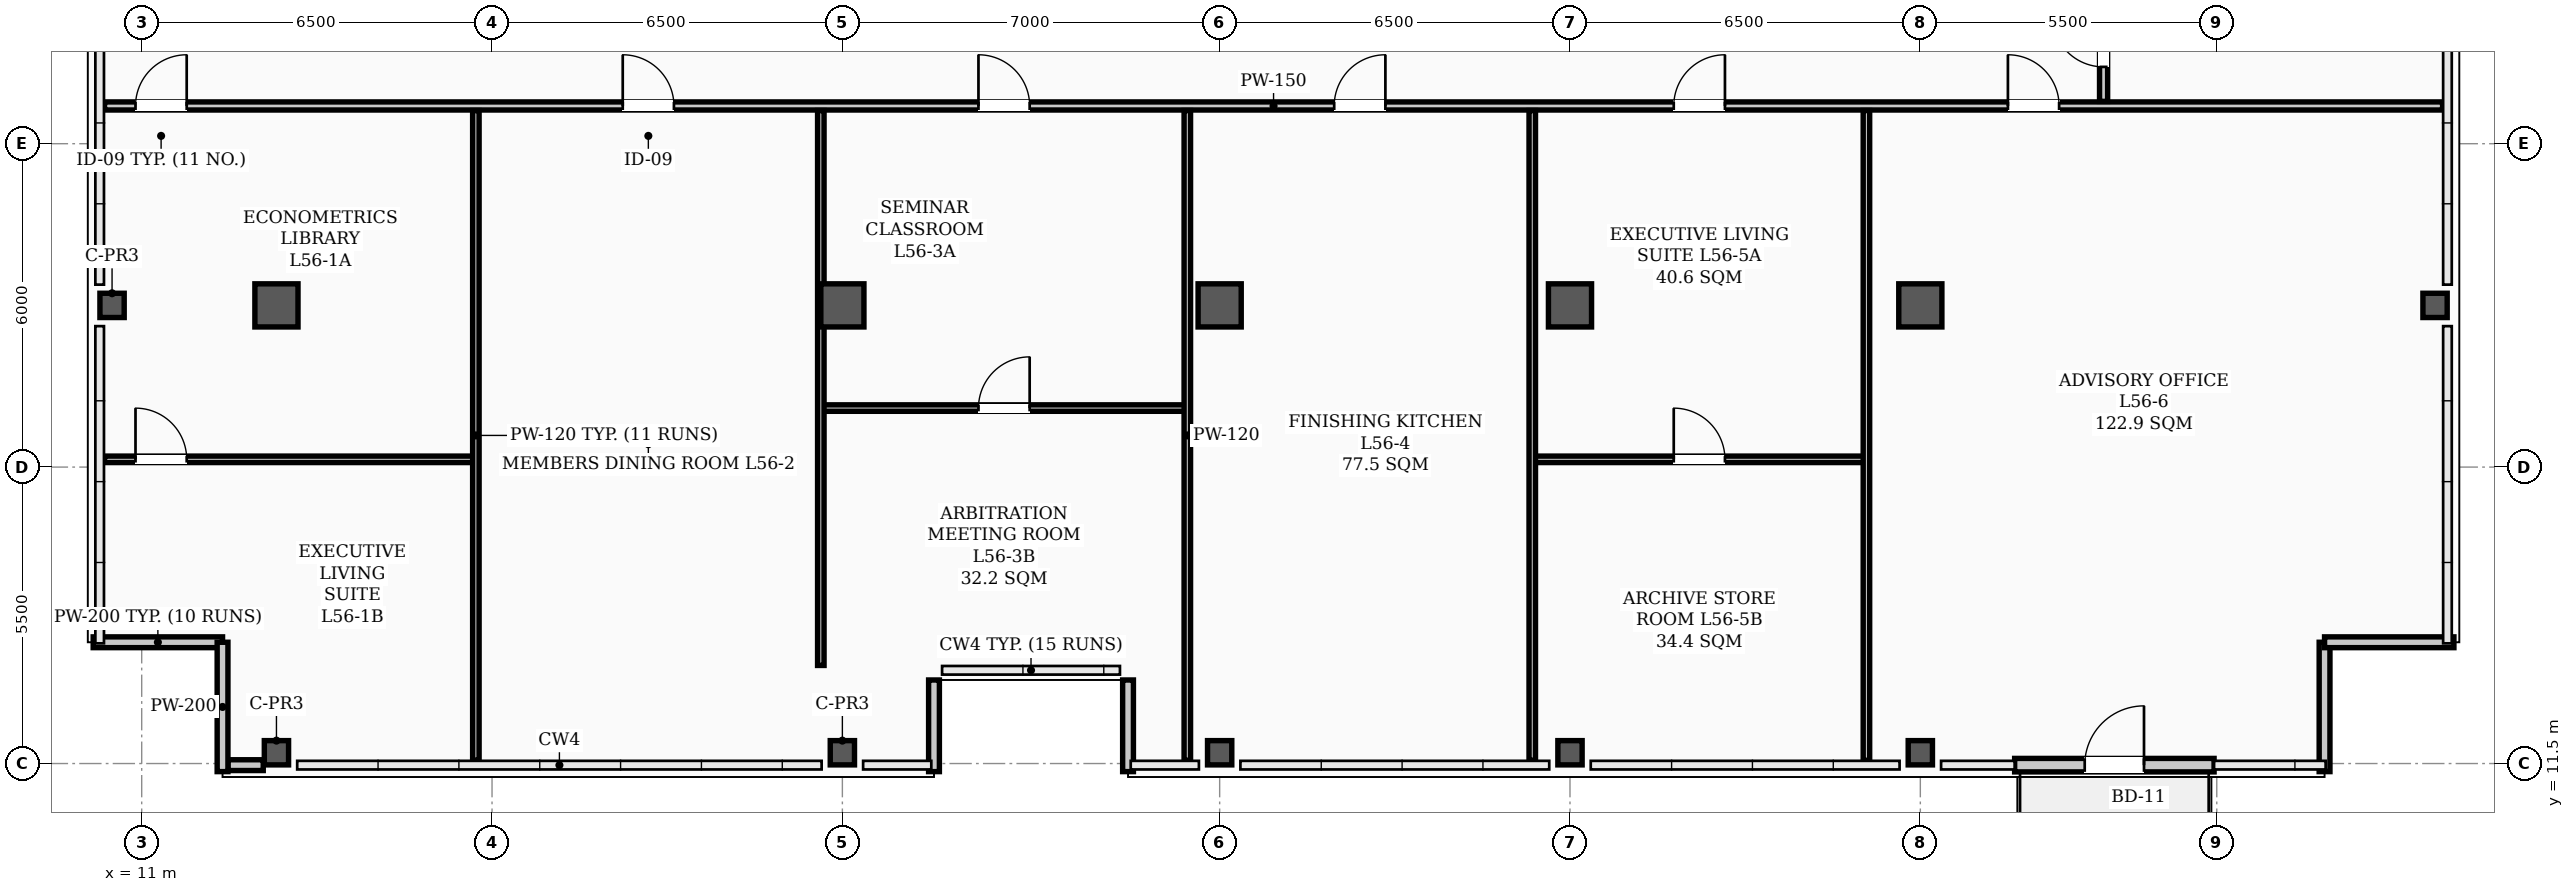
"""IFC4 building model, lengths in metres.
Left out: names, types, materials, properties, quantities, classifications, styles, units other than length and angle.
Written with IfcOpenShell. Run it as: python <this file> out.ifc"""

import sys

from ifc_helpers import new_model, si_unit, direction, frame, frame_2d, origin, origin_2d, place, context, subcontext, project, spatial, rectangle, hollow_rectangle, extrude, element, fill, save


model = new_model("IFC4")
c1 = context("Model", 3, precision=1e-05, world=origin(), true_north=direction((0.0, 1.0)))
c2 = subcontext(c1, "Body", "Model", "MODEL_VIEW")
j1 = project(units=[si_unit("LENGTHUNIT", "METRE"), si_unit("PLANEANGLEUNIT", "RADIAN")], contexts=[c1])
p1 = place(None, origin())
s1 = spatial("IfcSite", under=j1, at=p1, CompositionType="ELEMENT")
p2 = place(p1, origin())
s2 = spatial("IfcBuilding", under=s1, at=p2, CompositionType="ELEMENT")
p3 = place(p2, frame((0.0, 0.0, 226.7)))
s3 = spatial("IfcBuildingStorey", under=s2, at=p3, CompositionType="ELEMENT", Elevation=226.7)
for number, where, z_axis, x_axis in (
    (1, (13.5, 20.0, 0.0), (0.0, 0.0, 1.0), (1.0, 0.0, 0.0)),
    (2, (24.0, 20.0, 0.0), (0.0, 0.0, 1.0), (1.0, 0.0, 0.0)),
    (3, (31.0, 20.0, 0.0), (0.0, 0.0, 1.0), (1.0, 0.0, 0.0)),
    (4, (37.5, 20.0, 0.0), (0.0, 0.0, 1.0), (1.0, 0.0, 0.0)),
    (5, (44.0, 20.0, 0.0), (0.0, 0.0, 1.0), (1.0, 0.0, 0.0)),
):
    element("IfcColumn", number, at=place(p3, frame(where, z_axis=z_axis, x_axis=x_axis)), inside=s3, PredefinedType="COLUMN", context=c2, shape_type="SweptSolid", body=[
        extrude(hollow_rectangle(XDim=0.8, YDim=0.8, WallThickness=0.032, InnerFilletRadius=0.016, OuterFilletRadius=0.048, at=origin_2d()), origin(), (0.0, 0.0, 1.0), 3.9),
    ])
p4 = place(p3, frame((10.45, 20.0, 0.0), z_axis=(0.0, 0.0, 1.0), x_axis=(1.0, 0.0, 0.0)))
e6 = element("IfcColumn", 6, at=p4, inside=s3, PredefinedType="COLUMN", context=c2, shape_type="SweptSolid", body=[
    extrude(hollow_rectangle(XDim=0.45, YDim=0.45, WallThickness=0.022, InnerFilletRadius=0.022, OuterFilletRadius=0.044, at=origin_2d()), origin(), (0.0, 0.0, 1.0), 3.9),
])
for number, where, z_axis, x_axis in (
    (7, (13.5, 11.7, 0.0), (0.0, 0.0, 1.0), (1.0, 0.0, 0.0)),
    (8, (24.0, 11.7, 0.0), (0.0, 0.0, 1.0), (1.0, 0.0, 0.0)),
    (9, (31.0, 11.7, 0.0), (0.0, 0.0, 1.0), (1.0, 0.0, 0.0)),
    (10, (37.5, 11.7, 0.0), (0.0, 0.0, 1.0), (1.0, 0.0, 0.0)),
    (11, (44.0, 11.7, 0.0), (0.0, 0.0, 1.0), (1.0, 0.0, 0.0)),
    (12, (53.55, 20.0, 0.0), (0.0, 0.0, 1.0), (1.0, 0.0, 0.0)),
):
    element("IfcColumn", number, at=place(p3, frame(where, z_axis=z_axis, x_axis=x_axis)), inside=s3, PredefinedType="COLUMN", context=c2, shape_type="SweptSolid", body=[
        extrude(hollow_rectangle(XDim=0.45, YDim=0.45, WallThickness=0.022, InnerFilletRadius=0.022, OuterFilletRadius=0.044, at=origin_2d()), origin(), (0.0, 0.0, 1.0), 3.66),
    ])
p5 = place(p3, frame((12.6, 11.47, 0.0), z_axis=(0.0, 0.0, 1.0), x_axis=(1.0, 0.0, 0.0)))
e13 = element("IfcWall", 13, at=p5, inside=s3, PredefinedType="PARAPET", context=c2, shape_type="SweptSolid", body=[
    extrude(rectangle(XDim=0.655, YDim=0.2, at=frame_2d((0.327, 0.0))), origin(), (0.0, 0.0, 1.0), 1.2),
])
for number, where, z_axis, x_axis in (
    (14, (10.1, 13.75, 0.0), (0.0, 0.0, 1.0), (1.0, 0.0, 0.0)),
    (15, (12.5, 13.75, 0.0), (0.0, 0.0, 1.0), (0.0, -1.0, 0.0)),
    (16, (51.5, 11.35, 0.0), (0.0, 0.0, 1.0), (0.0, 1.0, 0.0)),
    (17, (51.5, 13.75, 0.0), (0.0, 0.0, 1.0), (1.0, 0.0, 0.0)),
):
    element("IfcWall", number, at=place(p3, frame(where, z_axis=z_axis, x_axis=x_axis)), inside=s3, PredefinedType="PARAPET", context=c2, shape_type="SweptSolid", body=[
        extrude(rectangle(XDim=2.4, YDim=0.2, at=frame_2d((1.2, 0.0))), origin(), (0.0, 0.0, 1.0), 1.2),
    ])
for number, where, z_axis, x_axis in (
    (18, (25.7, 11.35, 0.0), (0.0, 0.0, 1.0), (0.0, 1.0, 0.0)),
    (19, (29.3, 13.05, 0.0), (0.0, 0.0, 1.0), (0.0, -1.0, 0.0)),
):
    element("IfcWall", number, at=place(p3, frame(where, z_axis=z_axis, x_axis=x_axis)), inside=s3, PredefinedType="PARAPET", context=c2, shape_type="SweptSolid", body=[
        extrude(rectangle(XDim=1.7, YDim=0.2, at=frame_2d((0.85, 0.0))), origin(), (0.0, 0.0, 1.0), 1.2),
    ])
p6 = place(p3, frame((45.75, 11.47, 0.0), z_axis=(0.0, 0.0, 1.0), x_axis=(1.0, 0.0, 0.0)))
e20 = element("IfcWall", 20, at=p6, inside=s3, PredefinedType="STANDARD", context=c2, shape_type="SweptSolid", body=[
    extrude(rectangle(XDim=3.7, YDim=0.25, at=frame_2d((1.85, 0.0))), origin(), (0.0, 0.0, 1.0), 2.22),
])
p7 = place(p6, frame((1.3, 0.0, 0.0)))
e21 = element("IfcOpeningElement", 21, at=p7, cuts=e20, PredefinedType="OPENING", context=c2, shape_type="SweptSolid", body=[
    extrude(rectangle(XDim=1.1, YDim=2.2, at=frame_2d((0.55, 1.1))), frame((0.0, 0.135, 0.0), z_axis=(0.0, -1.0, 0.0), x_axis=(1.0, 0.0, 0.0)), (0.0, 0.0, 1.0), 0.27),
])
p8 = place(p3, frame((10.31, 23.7, 0.0), z_axis=(0.0, 0.0, 1.0), x_axis=(1.0, 0.0, 0.0)))
e22 = element("IfcWall", 22, at=p8, inside=s3, PredefinedType="PARTITIONING", context=c2, shape_type="SweptSolid", body=[
    extrude(rectangle(XDim=43.38, YDim=0.15, at=frame_2d((21.69, 0.0))), origin(), (0.0, 0.0, 1.0), 2.24),
])
p9 = place(p8, frame((0.575, 0.0, 0.0)))
e23 = element("IfcOpeningElement", 23, at=p9, cuts=e22, PredefinedType="OPENING", context=c2, shape_type="SweptSolid", body=[
    extrude(rectangle(XDim=0.95, YDim=2.08, at=frame_2d((0.475, 1.04))), frame((0.0, 0.085, 0.0), z_axis=(0.0, -1.0, 0.0), x_axis=(1.0, 0.0, 0.0)), (0.0, 0.0, 1.0), 0.17),
])
p10 = place(p8, frame((9.615, 0.0, 0.0)))
e24 = element("IfcOpeningElement", 24, at=p10, cuts=e22, PredefinedType="OPENING", context=c2, shape_type="SweptSolid", body=[
    extrude(rectangle(XDim=0.95, YDim=2.08, at=frame_2d((0.475, 1.04))), frame((0.0, 0.085, 0.0), z_axis=(0.0, -1.0, 0.0), x_axis=(1.0, 0.0, 0.0)), (0.0, 0.0, 1.0), 0.17),
])
p11 = place(p8, frame((16.215, 0.0, 0.0)))
e25 = element("IfcOpeningElement", 25, at=p11, cuts=e22, PredefinedType="OPENING", context=c2, shape_type="SweptSolid", body=[
    extrude(rectangle(XDim=0.95, YDim=2.08, at=frame_2d((0.475, 1.04))), frame((0.0, 0.085, 0.0), z_axis=(0.0, -1.0, 0.0), x_axis=(1.0, 0.0, 0.0)), (0.0, 0.0, 1.0), 0.17),
])
p12 = place(p8, frame((22.815, 0.0, 0.0)))
e26 = element("IfcOpeningElement", 26, at=p12, cuts=e22, PredefinedType="OPENING", context=c2, shape_type="SweptSolid", body=[
    extrude(rectangle(XDim=0.95, YDim=2.08, at=frame_2d((0.475, 1.04))), frame((0.0, 0.085, 0.0), z_axis=(0.0, -1.0, 0.0), x_axis=(1.0, 0.0, 0.0)), (0.0, 0.0, 1.0), 0.17),
])
p13 = place(p8, frame((29.115, 0.0, 0.0)))
e27 = element("IfcOpeningElement", 27, at=p13, cuts=e22, PredefinedType="OPENING", context=c2, shape_type="SweptSolid", body=[
    extrude(rectangle(XDim=0.95, YDim=2.08, at=frame_2d((0.475, 1.04))), frame((0.0, 0.085, 0.0), z_axis=(0.0, -1.0, 0.0), x_axis=(1.0, 0.0, 0.0)), (0.0, 0.0, 1.0), 0.17),
])
p14 = place(p8, frame((35.315, 0.0, 0.0)))
e28 = element("IfcOpeningElement", 28, at=p14, cuts=e22, PredefinedType="OPENING", context=c2, shape_type="SweptSolid", body=[
    extrude(rectangle(XDim=0.95, YDim=2.08, at=frame_2d((0.475, 1.04))), frame((0.0, 0.085, 0.0), z_axis=(0.0, -1.0, 0.0), x_axis=(1.0, 0.0, 0.0)), (0.0, 0.0, 1.0), 0.17),
])
p15 = place(p3, frame((10.31, 17.144, 0.0), z_axis=(0.0, 0.0, 1.0), x_axis=(1.0, 0.0, 0.0)))
e29 = element("IfcWall", 29, at=p15, inside=s3, PredefinedType="PARTITIONING", context=c2, shape_type="SweptSolid", body=[
    extrude(rectangle(XDim=6.89, YDim=0.12, at=frame_2d((3.445, 0.0))), origin(), (0.0, 0.0, 1.0), 2.24),
])
p16 = place(p15, frame((0.575, 0.0, 0.0)))
e30 = element("IfcOpeningElement", 30, at=p16, cuts=e29, PredefinedType="OPENING", context=c2, shape_type="SweptSolid", body=[
    extrude(rectangle(XDim=0.95, YDim=2.08, at=frame_2d((0.475, 1.04))), frame((0.0, 0.07, 0.0), z_axis=(0.0, -1.0, 0.0), x_axis=(1.0, 0.0, 0.0)), (0.0, 0.0, 1.0), 0.14),
])
p17 = place(p3, frame((23.6, 18.095, 0.0), z_axis=(0.0, 0.0, 1.0), x_axis=(1.0, 0.0, 0.0)))
e31 = element("IfcWall", 31, at=p17, inside=s3, PredefinedType="PARTITIONING", context=c2, shape_type="SweptSolid", body=[
    extrude(rectangle(XDim=6.8, YDim=0.12, at=frame_2d((3.4, 0.0))), origin(), (0.0, 0.0, 1.0), 2.24),
])
p18 = place(p17, frame((2.925, 0.0, 0.0)))
e32 = element("IfcOpeningElement", 32, at=p18, cuts=e31, PredefinedType="OPENING", context=c2, shape_type="SweptSolid", body=[
    extrude(rectangle(XDim=0.95, YDim=2.08, at=frame_2d((0.475, 1.04))), frame((0.0, 0.07, 0.0), z_axis=(0.0, -1.0, 0.0), x_axis=(1.0, 0.0, 0.0)), (0.0, 0.0, 1.0), 0.14),
])
p19 = place(p3, frame((36.8, 17.144, 0.0), z_axis=(0.0, 0.0, 1.0), x_axis=(1.0, 0.0, 0.0)))
e33 = element("IfcWall", 33, at=p19, inside=s3, PredefinedType="PARTITIONING", context=c2, shape_type="SweptSolid", body=[
    extrude(rectangle(XDim=6.2, YDim=0.12, at=frame_2d((3.1, 0.0))), origin(), (0.0, 0.0, 1.0), 2.24),
])
p20 = place(p19, frame((2.625, 0.0, 0.0)))
e34 = element("IfcOpeningElement", 34, at=p20, cuts=e33, PredefinedType="OPENING", context=c2, shape_type="SweptSolid", body=[
    extrude(rectangle(XDim=0.95, YDim=2.08, at=frame_2d((0.475, 1.04))), frame((0.0, 0.07, 0.0), z_axis=(0.0, -1.0, 0.0), x_axis=(1.0, 0.0, 0.0)), (0.0, 0.0, 1.0), 0.14),
])
p21 = place(p3, frame((47.4, 23.785, 0.0), z_axis=(0.0, 0.0, 1.0), x_axis=(0.0, 1.0, 0.0)))
e35 = element("IfcWall", 35, at=p21, inside=s3, PredefinedType="PARTITIONING", context=c2, shape_type="SweptSolid", body=[
    extrude(rectangle(XDim=13.13, YDim=0.15, at=frame_2d((6.565, 0.0))), origin(), (0.0, 0.0, 1.0), 2.24),
])
p22 = place(p21, frame((0.64, 0.0, 0.0)))
e36 = element("IfcOpeningElement", 36, at=p22, cuts=e35, PredefinedType="OPENING", context=c2, shape_type="SweptSolid", body=[
    extrude(rectangle(XDim=0.95, YDim=2.08, at=frame_2d((0.475, 1.04))), frame((0.0, 0.085, 0.0), z_axis=(0.0, -1.0, 0.0), x_axis=(1.0, 0.0, 0.0)), (0.0, 0.0, 1.0), 0.17),
])
p23 = place(p21, frame((10.44, 0.0, 0.0)))
e37 = element("IfcOpeningElement", 37, at=p23, cuts=e35, PredefinedType="OPENING", context=c2, shape_type="SweptSolid", body=[
    extrude(rectangle(XDim=0.95, YDim=2.08, at=frame_2d((0.475, 1.04))), frame((0.0, 0.085, 0.0), z_axis=(0.0, -1.0, 0.0), x_axis=(1.0, 0.0, 0.0)), (0.0, 0.0, 1.0), 0.17),
])
p24 = place(p3, frame((17.2, 11.56, 0.0), z_axis=(0.0, 0.0, 1.0), x_axis=(0.0, 1.0, 0.0)))
e38 = element("IfcWall", 38, at=p24, inside=s3, PredefinedType="PARTITIONING", context=c2, shape_type="SweptSolid", body=[
    extrude(rectangle(XDim=12.055, YDim=0.12, at=frame_2d((6.027, 0.0))), origin(), (0.0, 0.0, 1.0), 2.24),
])
p25 = place(p3, frame((23.6, 13.32, 0.0), z_axis=(0.0, 0.0, 1.0), x_axis=(0.0, 1.0, 0.0)))
e39 = element("IfcWall", 39, at=p25, inside=s3, PredefinedType="PARTITIONING", context=c2, shape_type="SweptSolid", body=[
    extrude(rectangle(XDim=10.295, YDim=0.12, at=frame_2d((5.147, 0.0))), origin(), (0.0, 0.0, 1.0), 2.24),
])
for number, where, z_axis, x_axis in (
    (40, (30.4, 11.56, 0.0), (0.0, 0.0, 1.0), (0.0, 1.0, 0.0)),
    (41, (36.8, 11.56, 0.0), (0.0, 0.0, 1.0), (0.0, 1.0, 0.0)),
    (42, (43.0, 11.56, 0.0), (0.0, 0.0, 1.0), (0.0, 1.0, 0.0)),
):
    element("IfcWall", number, at=place(p3, frame(where, z_axis=z_axis, x_axis=x_axis)), inside=s3, PredefinedType="PARTITIONING", context=c2, shape_type="SweptSolid", body=[
        extrude(rectangle(XDim=12.055, YDim=0.12, at=frame_2d((6.027, 0.0))), origin(), (0.0, 0.0, 1.0), 2.24),
    ])
p26 = place(p7, origin())
e43 = element("IfcDoor", 43, at=p26, inside=s3, OperationType="SINGLE_SWING_RIGHT", PredefinedType="DOOR", context=c2, shape_type="SweptSolid", body=[
    extrude(rectangle(XDim=1.1, YDim=2.2, at=frame_2d((0.55, 1.1))), frame((0.0, 0.025, 0.0), z_axis=(0.0, -1.0, 0.0), x_axis=(1.0, 0.0, 0.0)), (0.0, 0.0, 1.0), 0.05),
])
fill(e21, e43)
p27 = place(p16, origin())
e44 = element("IfcDoor", 44, at=p27, inside=s3, OperationType="SINGLE_SWING_LEFT", PredefinedType="DOOR", context=c2, shape_type="SweptSolid", body=[
    extrude(rectangle(XDim=0.95, YDim=2.08, at=frame_2d((0.475, 1.04))), frame((0.0, 0.025, 0.0), z_axis=(0.0, -1.0, 0.0), x_axis=(1.0, 0.0, 0.0)), (0.0, 0.0, 1.0), 0.05),
])
fill(e30, e44)
p28 = place(p9, origin())
e45 = element("IfcDoor", 45, at=p28, inside=s3, OperationType="SINGLE_SWING_RIGHT", PredefinedType="DOOR", context=c2, shape_type="SweptSolid", body=[
    extrude(rectangle(XDim=0.95, YDim=2.08, at=frame_2d((0.475, 1.04))), frame((0.0, 0.025, 0.0), z_axis=(0.0, -1.0, 0.0), x_axis=(1.0, 0.0, 0.0)), (0.0, 0.0, 1.0), 0.05),
])
fill(e23, e45)
p29 = place(p10, origin())
e46 = element("IfcDoor", 46, at=p29, inside=s3, OperationType="SINGLE_SWING_LEFT", PredefinedType="DOOR", context=c2, shape_type="SweptSolid", body=[
    extrude(rectangle(XDim=0.95, YDim=2.08, at=frame_2d((0.475, 1.04))), frame((0.0, 0.025, 0.0), z_axis=(0.0, -1.0, 0.0), x_axis=(1.0, 0.0, 0.0)), (0.0, 0.0, 1.0), 0.05),
])
fill(e24, e46)
p30 = place(p18, origin())
e47 = element("IfcDoor", 47, at=p30, inside=s3, OperationType="SINGLE_SWING_RIGHT", PredefinedType="DOOR", context=c2, shape_type="SweptSolid", body=[
    extrude(rectangle(XDim=0.95, YDim=2.08, at=frame_2d((0.475, 1.04))), frame((0.0, 0.025, 0.0), z_axis=(0.0, -1.0, 0.0), x_axis=(1.0, 0.0, 0.0)), (0.0, 0.0, 1.0), 0.05),
])
fill(e32, e47)
p31 = place(p11, origin())
e48 = element("IfcDoor", 48, at=p31, inside=s3, OperationType="SINGLE_SWING_LEFT", PredefinedType="DOOR", context=c2, shape_type="SweptSolid", body=[
    extrude(rectangle(XDim=0.95, YDim=2.08, at=frame_2d((0.475, 1.04))), frame((0.0, 0.025, 0.0), z_axis=(0.0, -1.0, 0.0), x_axis=(1.0, 0.0, 0.0)), (0.0, 0.0, 1.0), 0.05),
])
fill(e25, e48)
p32 = place(p12, origin())
e49 = element("IfcDoor", 49, at=p32, inside=s3, OperationType="SINGLE_SWING_RIGHT", PredefinedType="DOOR", context=c2, shape_type="SweptSolid", body=[
    extrude(rectangle(XDim=0.95, YDim=2.08, at=frame_2d((0.475, 1.04))), frame((0.0, 0.025, 0.0), z_axis=(0.0, -1.0, 0.0), x_axis=(1.0, 0.0, 0.0)), (0.0, 0.0, 1.0), 0.05),
])
fill(e26, e49)
p33 = place(p20, origin())
e50 = element("IfcDoor", 50, at=p33, inside=s3, OperationType="SINGLE_SWING_LEFT", PredefinedType="DOOR", context=c2, shape_type="SweptSolid", body=[
    extrude(rectangle(XDim=0.95, YDim=2.08, at=frame_2d((0.475, 1.04))), frame((0.0, 0.025, 0.0), z_axis=(0.0, -1.0, 0.0), x_axis=(1.0, 0.0, 0.0)), (0.0, 0.0, 1.0), 0.05),
])
fill(e34, e50)
p34 = place(p13, origin())
e51 = element("IfcDoor", 51, at=p34, inside=s3, OperationType="SINGLE_SWING_RIGHT", PredefinedType="DOOR", context=c2, shape_type="SweptSolid", body=[
    extrude(rectangle(XDim=0.95, YDim=2.08, at=frame_2d((0.475, 1.04))), frame((0.0, 0.025, 0.0), z_axis=(0.0, -1.0, 0.0), x_axis=(1.0, 0.0, 0.0)), (0.0, 0.0, 1.0), 0.05),
])
fill(e27, e51)
p35 = place(p14, origin())
e52 = element("IfcDoor", 52, at=p35, inside=s3, OperationType="SINGLE_SWING_LEFT", PredefinedType="DOOR", context=c2, shape_type="SweptSolid", body=[
    extrude(rectangle(XDim=0.95, YDim=2.08, at=frame_2d((0.475, 1.04))), frame((0.0, 0.025, 0.0), z_axis=(0.0, -1.0, 0.0), x_axis=(1.0, 0.0, 0.0)), (0.0, 0.0, 1.0), 0.05),
])
fill(e28, e52)
p36 = place(p22, origin())
e53 = element("IfcDoor", 53, at=p36, inside=s3, OperationType="SINGLE_SWING_RIGHT", PredefinedType="DOOR", context=c2, shape_type="SweptSolid", body=[
    extrude(rectangle(XDim=0.95, YDim=2.08, at=frame_2d((0.475, 1.04))), frame((0.0, 0.025, 0.0), z_axis=(0.0, -1.0, 0.0), x_axis=(1.0, 0.0, 0.0)), (0.0, 0.0, 1.0), 0.05),
])
fill(e36, e53)
save(model, sys.argv[1])
